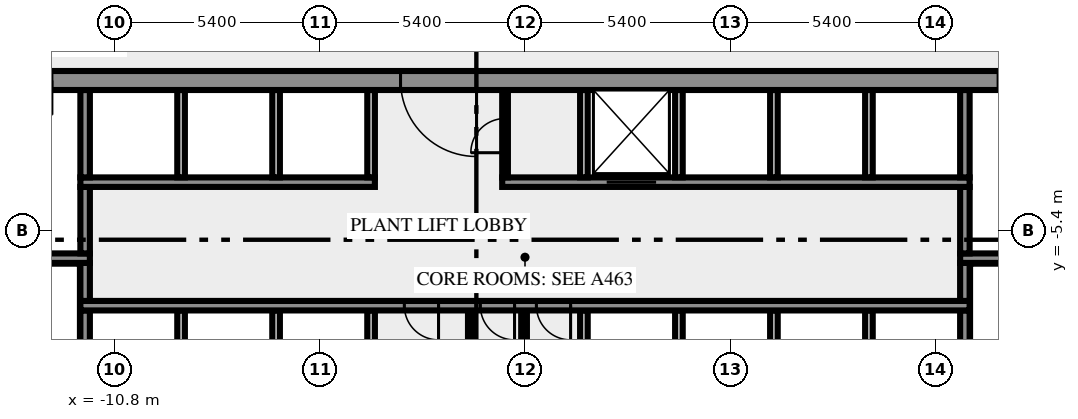
"""IFC4 building model, lengths in metres.
Left out: names, types, materials, properties, quantities, classifications, styles, units other than length and angle.
Written with IfcOpenShell. Run it as: python <this file> out.ifc"""

import sys

from ifc_helpers import new_model, si_unit, direction, frame, frame_2d, origin, place, context, subcontext, project, spatial, rectangle, extrude, element, fill, save


model = new_model("IFC4")
c1 = context("Model", 3, precision=1e-05, world=origin(), true_north=direction((0.0, 1.0)))
c2 = subcontext(c1, "Body", "Model", "MODEL_VIEW")
j1 = project(units=[si_unit("LENGTHUNIT", "METRE"), si_unit("PLANEANGLEUNIT", "RADIAN")], contexts=[c1])
p1 = place(None, origin())
s1 = spatial("IfcSite", under=j1, at=p1, CompositionType="ELEMENT")
p2 = place(p1, origin())
s2 = spatial("IfcBuilding", under=s1, at=p2, CompositionType="ELEMENT")
p3 = place(p2, frame((0.0, 0.0, 79.0)))
s3 = spatial("IfcBuildingStorey", under=s2, at=p3, CompositionType="ELEMENT", Elevation=79.0)
p4 = place(p3, frame((-11.575, -10.5, 0.0), z_axis=(0.0, 0.0, 1.0), x_axis=(0.0, 1.0, 0.0)))
e1 = element("IfcWall", 1, at=p4, inside=s3, PredefinedType="SHEAR", context=c2, shape_type="SweptSolid", body=[
    extrude(rectangle(XDim=3.0, YDim=0.25, at=frame_2d((1.5, 0.0))), origin(), (0.0, 0.0, 1.0), 5.65),
])
for number, where, z_axis, x_axis in (
    (2, (-9.05, -10.5, 0.0), (0.0, 0.0, 1.0), (0.0, 1.0, 0.0)),
    (3, (-6.55, -10.5, 0.0), (0.0, 0.0, 1.0), (0.0, 1.0, 0.0)),
    (4, (-4.05, -10.5, 0.0), (0.0, 0.0, 1.0), (0.0, 1.0, 0.0)),
):
    element("IfcWall", number, at=place(p3, frame(where, z_axis=z_axis, x_axis=x_axis)), inside=s3, PredefinedType="SOLIDWALL", context=c2, shape_type="SweptSolid", body=[
        extrude(rectangle(XDim=3.0, YDim=0.2, at=frame_2d((1.5, 0.0))), origin(), (0.0, 0.0, 1.0), 5.65),
    ])
for number, where, z_axis, x_axis in (
    (5, (-1.425, -10.5, 0.0), (0.0, 0.0, 1.0), (0.0, 1.0, 0.0)),
    (6, (-0.025, -10.5, 0.0), (0.0, 0.0, 1.0), (0.0, 1.0, 0.0)),
):
    element("IfcWall", number, at=place(p3, frame(where, z_axis=z_axis, x_axis=x_axis)), inside=s3, PredefinedType="PARTITIONING", context=c2, shape_type="SweptSolid", body=[
        extrude(rectangle(XDim=3.0, YDim=0.15, at=frame_2d((1.5, 0.0))), origin(), (0.0, 0.0, 1.0), 5.65),
    ])
for number, where, z_axis, x_axis in (
    (7, (1.55, -10.5, 0.0), (0.0, 0.0, 1.0), (0.0, 1.0, 0.0)),
    (8, (4.05, -10.5, 0.0), (0.0, 0.0, 1.0), (0.0, 1.0, 0.0)),
    (9, (6.55, -10.5, 0.0), (0.0, 0.0, 1.0), (0.0, 1.0, 0.0)),
    (10, (9.05, -10.5, 0.0), (0.0, 0.0, 1.0), (0.0, 1.0, 0.0)),
):
    element("IfcWall", number, at=place(p3, frame(where, z_axis=z_axis, x_axis=x_axis)), inside=s3, PredefinedType="SOLIDWALL", context=c2, shape_type="SweptSolid", body=[
        extrude(rectangle(XDim=3.0, YDim=0.2, at=frame_2d((1.5, 0.0))), origin(), (0.0, 0.0, 1.0), 5.65),
    ])
p5 = place(p3, frame((11.575, -10.5, 0.0), z_axis=(0.0, 0.0, 1.0), x_axis=(0.0, 1.0, 0.0)))
e11 = element("IfcWall", 11, at=p5, inside=s3, PredefinedType="SHEAR", context=c2, shape_type="SweptSolid", body=[
    extrude(rectangle(XDim=3.0, YDim=0.25, at=frame_2d((1.5, 0.0))), origin(), (0.0, 0.0, 1.0), 5.65),
])
p6 = place(p3, frame((11.7, -7.375, 0.0), z_axis=(0.0, 0.0, 1.0), x_axis=(-1.0, 0.0, 0.0)))
e12 = element("IfcWall", 12, at=p6, inside=s3, PredefinedType="SHEAR", context=c2, shape_type="SweptSolid", body=[
    extrude(rectangle(XDim=23.4, YDim=0.25, at=frame_2d((11.7, 0.0))), origin(), (0.0, 0.0, 1.0), 5.65),
])
p7 = place(p6, frame((13.975, 0.0, 0.0)))
e13 = element("IfcOpeningElement", 13, at=p7, cuts=e12, PredefinedType="OPENING", context=c2, shape_type="SweptSolid", body=[
    extrude(rectangle(XDim=0.9, YDim=2.1, at=frame_2d((0.45, 1.05))), frame((0.0, 0.135, 0.0), z_axis=(0.0, -1.0, 0.0), x_axis=(1.0, 0.0, 0.0)), (0.0, 0.0, 1.0), 0.27),
])
p8 = place(p6, frame((11.975, 0.0, 0.0)))
e14 = element("IfcOpeningElement", 14, at=p8, cuts=e12, PredefinedType="OPENING", context=c2, shape_type="SweptSolid", body=[
    extrude(rectangle(XDim=0.9, YDim=2.1, at=frame_2d((0.45, 1.05))), frame((0.0, 0.135, 0.0), z_axis=(0.0, -1.0, 0.0), x_axis=(1.0, 0.0, 0.0)), (0.0, 0.0, 1.0), 0.27),
])
p9 = place(p6, frame((10.5, 0.0, 0.0)))
e15 = element("IfcOpeningElement", 15, at=p9, cuts=e12, PredefinedType="OPENING", context=c2, shape_type="SweptSolid", body=[
    extrude(rectangle(XDim=0.9, YDim=2.1, at=frame_2d((0.45, 1.05))), frame((0.0, 0.135, 0.0), z_axis=(0.0, -1.0, 0.0), x_axis=(1.0, 0.0, 0.0)), (0.0, 0.0, 1.0), 0.27),
])
for number, where, z_axis, x_axis in (
    (16, (-11.575, -7.25, 0.0), (0.0, 0.0, 1.0), (0.0, 1.0, 0.0)),
    (17, (11.575, -7.25, 0.0), (0.0, 0.0, 1.0), (0.0, 1.0, 0.0)),
):
    element("IfcWall", number, at=place(p3, frame(where, z_axis=z_axis, x_axis=x_axis)), inside=s3, PredefinedType="SHEAR", context=c2, shape_type="SweptSolid", body=[
        extrude(rectangle(XDim=1.0, YDim=0.25, at=frame_2d((0.5, 0.0))), origin(), (0.0, 0.0, 1.0), 5.65),
    ])
p10 = place(p3, frame((-11.45, -6.125, 0.0), z_axis=(0.0, 0.0, 1.0), x_axis=(-1.0, 0.0, 0.0)))
e18 = element("IfcWall", 18, at=p10, inside=s3, PredefinedType="SHEAR", context=c2, shape_type="SweptSolid", body=[
    extrude(rectangle(XDim=8.05, YDim=0.25, at=frame_2d((4.025, 0.0))), origin(), (0.0, 0.0, 1.0), 5.65),
])
p11 = place(p10, frame((6.2, 0.0, 0.0)))
e19 = element("IfcOpeningElement", 19, at=p11, cuts=e18, PredefinedType="OPENING", context=c2, shape_type="SweptSolid", body=[
    extrude(rectangle(XDim=1.8, YDim=2.1, at=frame_2d((0.9, 1.05))), frame((0.0, 0.135, 0.0), z_axis=(0.0, -1.0, 0.0), x_axis=(1.0, 0.0, 0.0)), (0.0, 0.0, 1.0), 0.27),
])
p12 = place(p3, frame((19.5, -6.125, 0.0), z_axis=(0.0, 0.0, 1.0), x_axis=(-1.0, 0.0, 0.0)))
e20 = element("IfcWall", 20, at=p12, inside=s3, PredefinedType="SHEAR", context=c2, shape_type="SweptSolid", body=[
    extrude(rectangle(XDim=8.05, YDim=0.25, at=frame_2d((4.025, 0.0))), origin(), (0.0, 0.0, 1.0), 5.65),
])
p13 = place(p12, frame((0.05, 0.0, 0.0)))
e21 = element("IfcOpeningElement", 21, at=p13, cuts=e20, PredefinedType="OPENING", context=c2, shape_type="SweptSolid", body=[
    extrude(rectangle(XDim=1.8, YDim=2.1, at=frame_2d((0.9, 1.05))), frame((0.0, 0.135, 0.0), z_axis=(0.0, -1.0, 0.0), x_axis=(1.0, 0.0, 0.0)), (0.0, 0.0, 1.0), 0.27),
])
for number, where, z_axis, x_axis in (
    (22, (-11.575, -6.0, 0.0), (0.0, 0.0, 1.0), (0.0, 1.0, 0.0)),
    (23, (11.575, -6.0, 0.0), (0.0, 0.0, 1.0), (0.0, 1.0, 0.0)),
):
    element("IfcWall", number, at=place(p3, frame(where, z_axis=z_axis, x_axis=x_axis)), inside=s3, PredefinedType="SHEAR", context=c2, shape_type="SweptSolid", body=[
        extrude(rectangle(XDim=1.75, YDim=0.25, at=frame_2d((0.875, 0.0))), origin(), (0.0, 0.0, 1.0), 5.65),
    ])
p14 = place(p3, frame((-11.7, -4.125, 0.0), z_axis=(0.0, 0.0, 1.0), x_axis=(1.0, 0.0, 0.0)))
e24 = element("IfcWall", 24, at=p14, inside=s3, PredefinedType="SHEAR", context=c2, shape_type="SweptSolid", body=[
    extrude(rectangle(XDim=7.75, YDim=0.25, at=frame_2d((3.875, 0.0))), origin(), (0.0, 0.0, 1.0), 5.65),
])
p15 = place(p3, frame((-0.6, -4.125, 0.0), z_axis=(0.0, 0.0, 1.0), x_axis=(1.0, 0.0, 0.0)))
e25 = element("IfcWall", 25, at=p15, inside=s3, PredefinedType="SHEAR", context=c2, shape_type="SweptSolid", body=[
    extrude(rectangle(XDim=12.3, YDim=0.25, at=frame_2d((6.15, 0.0))), origin(), (0.0, 0.0, 1.0), 5.65),
])
p16 = place(p15, frame((2.75, 0.0, 0.0)))
e26 = element("IfcOpeningElement", 26, at=p16, cuts=e25, PredefinedType="OPENING", context=c2, shape_type="SweptSolid", body=[
    extrude(rectangle(XDim=1.3, YDim=2.1, at=frame_2d((0.65, 1.05))), frame((0.0, 0.135, 0.0), z_axis=(0.0, -1.0, 0.0), x_axis=(1.0, 0.0, 0.0)), (0.0, 0.0, 1.0), 0.27),
])
p17 = place(p3, frame((-11.575, -4.0, 0.0), z_axis=(0.0, 0.0, 1.0), x_axis=(0.0, 1.0, 0.0)))
e27 = element("IfcWall", 27, at=p17, inside=s3, PredefinedType="SHEAR", context=c2, shape_type="SweptSolid", body=[
    extrude(rectangle(XDim=2.3, YDim=0.25, at=frame_2d((1.15, 0.0))), origin(), (0.0, 0.0, 1.0), 5.65),
])
for number, where, z_axis, x_axis in (
    (28, (-9.05, -4.0, 0.0), (0.0, 0.0, 1.0), (0.0, 1.0, 0.0)),
    (29, (-6.55, -4.0, 0.0), (0.0, 0.0, 1.0), (0.0, 1.0, 0.0)),
    (30, (-4.05, -4.0, 0.0), (0.0, 0.0, 1.0), (0.0, 1.0, 0.0)),
):
    element("IfcWall", number, at=place(p3, frame(where, z_axis=z_axis, x_axis=x_axis)), inside=s3, PredefinedType="SOLIDWALL", context=c2, shape_type="SweptSolid", body=[
        extrude(rectangle(XDim=2.3, YDim=0.2, at=frame_2d((1.15, 0.0))), origin(), (0.0, 0.0, 1.0), 5.65),
    ])
p18 = place(p3, frame((-0.525, -4.0, 0.0), z_axis=(0.0, 0.0, 1.0), x_axis=(0.0, 1.0, 0.0)))
e31 = element("IfcWall", 31, at=p18, inside=s3, PredefinedType="PARTITIONING", context=c2, shape_type="SweptSolid", body=[
    extrude(rectangle(XDim=2.3, YDim=0.15, at=frame_2d((1.15, 0.0))), origin(), (0.0, 0.0, 1.0), 5.65),
])
p19 = place(p18, frame((0.65, 0.0, 0.0)))
e32 = element("IfcOpeningElement", 32, at=p19, cuts=e31, PredefinedType="OPENING", context=c2, shape_type="SweptSolid", body=[
    extrude(rectangle(XDim=0.9, YDim=2.1, at=frame_2d((0.45, 1.05))), frame((0.0, 0.085, 0.0), z_axis=(0.0, -1.0, 0.0), x_axis=(1.0, 0.0, 0.0)), (0.0, 0.0, 1.0), 0.17),
])
for number, where, z_axis, x_axis in (
    (33, (1.55, -4.0, 0.0), (0.0, 0.0, 1.0), (0.0, 1.0, 0.0)),
    (34, (4.05, -4.0, 0.0), (0.0, 0.0, 1.0), (0.0, 1.0, 0.0)),
    (35, (6.55, -4.0, 0.0), (0.0, 0.0, 1.0), (0.0, 1.0, 0.0)),
    (36, (9.05, -4.0, 0.0), (0.0, 0.0, 1.0), (0.0, 1.0, 0.0)),
):
    element("IfcWall", number, at=place(p3, frame(where, z_axis=z_axis, x_axis=x_axis)), inside=s3, PredefinedType="SOLIDWALL", context=c2, shape_type="SweptSolid", body=[
        extrude(rectangle(XDim=2.3, YDim=0.2, at=frame_2d((1.15, 0.0))), origin(), (0.0, 0.0, 1.0), 5.65),
    ])
p20 = place(p3, frame((11.575, -4.0, 0.0), z_axis=(0.0, 0.0, 1.0), x_axis=(0.0, 1.0, 0.0)))
e37 = element("IfcWall", 37, at=p20, inside=s3, PredefinedType="SHEAR", context=c2, shape_type="SweptSolid", body=[
    extrude(rectangle(XDim=2.3, YDim=0.25, at=frame_2d((1.15, 0.0))), origin(), (0.0, 0.0, 1.0), 5.65),
])
p21 = place(p3, frame((20.49, -1.45, 0.0), z_axis=(0.0, 0.0, 1.0), x_axis=(-1.0, 0.0, 0.0)))
e38 = element("IfcWall", 38, at=p21, inside=s3, PredefinedType="SHEAR", context=c2, shape_type="SweptSolid", body=[
    extrude(rectangle(XDim=40.98, YDim=0.5, at=frame_2d((20.49, 0.0))), origin(), (0.0, 0.0, 1.0), 5.65),
])
p22 = place(p21, frame((38.14, 0.0, 0.0)))
e39 = element("IfcOpeningElement", 39, at=p22, cuts=e38, PredefinedType="OPENING", context=c2, shape_type="SweptSolid", body=[
    extrude(rectangle(XDim=1.8, YDim=2.1, at=frame_2d((0.9, 1.05))), frame((0.0, 0.26, 0.0), z_axis=(0.0, -1.0, 0.0), x_axis=(1.0, 0.0, 0.0)), (0.0, 0.0, 1.0), 0.52),
])
p23 = place(p21, frame((36.728, 0.0, 0.0)))
e40 = element("IfcOpeningElement", 40, at=p23, cuts=e38, PredefinedType="OPENING", context=c2, shape_type="SweptSolid", body=[
    extrude(rectangle(XDim=0.8, YDim=2.1, at=frame_2d((0.4, 1.05))), frame((0.0, 0.26, 0.0), z_axis=(0.0, -1.0, 0.0), x_axis=(1.0, 0.0, 0.0)), (0.0, 0.0, 1.0), 0.52),
])
p24 = place(p21, frame((35.153, 0.0, 0.0)))
e41 = element("IfcOpeningElement", 41, at=p24, cuts=e38, PredefinedType="OPENING", context=c2, shape_type="SweptSolid", body=[
    extrude(rectangle(XDim=0.8, YDim=2.1, at=frame_2d((0.4, 1.05))), frame((0.0, 0.26, 0.0), z_axis=(0.0, -1.0, 0.0), x_axis=(1.0, 0.0, 0.0)), (0.0, 0.0, 1.0), 0.52),
])
p25 = place(p21, frame((32.94, 0.0, 0.0)))
e42 = element("IfcOpeningElement", 42, at=p25, cuts=e38, PredefinedType="OPENING", context=c2, shape_type="SweptSolid", body=[
    extrude(rectangle(XDim=0.9, YDim=2.1, at=frame_2d((0.45, 1.05))), frame((0.0, 0.26, 0.0), z_axis=(0.0, -1.0, 0.0), x_axis=(1.0, 0.0, 0.0)), (0.0, 0.0, 1.0), 0.52),
])
p26 = place(p21, frame((21.765, 0.0, 0.0)))
e43 = element("IfcOpeningElement", 43, at=p26, cuts=e38, PredefinedType="OPENING", context=c2, shape_type="SweptSolid", body=[
    extrude(rectangle(XDim=2.0, YDim=2.1, at=frame_2d((1.0, 1.05))), frame((0.0, 0.26, 0.0), z_axis=(0.0, -1.0, 0.0), x_axis=(1.0, 0.0, 0.0)), (0.0, 0.0, 1.0), 0.52),
])
p27 = place(p21, frame((7.14, 0.0, 0.0)))
e44 = element("IfcOpeningElement", 44, at=p27, cuts=e38, PredefinedType="OPENING", context=c2, shape_type="SweptSolid", body=[
    extrude(rectangle(XDim=0.9, YDim=2.1, at=frame_2d((0.45, 1.05))), frame((0.0, 0.26, 0.0), z_axis=(0.0, -1.0, 0.0), x_axis=(1.0, 0.0, 0.0)), (0.0, 0.0, 1.0), 0.52),
])
p28 = place(p21, frame((4.19, 0.0, 0.0)))
e45 = element("IfcOpeningElement", 45, at=p28, cuts=e38, PredefinedType="OPENING", context=c2, shape_type="SweptSolid", body=[
    extrude(rectangle(XDim=0.9, YDim=2.1, at=frame_2d((0.45, 1.05))), frame((0.0, 0.26, 0.0), z_axis=(0.0, -1.0, 0.0), x_axis=(1.0, 0.0, 0.0)), (0.0, 0.0, 1.0), 0.52),
])
p29 = place(p21, frame((1.04, 0.0, 0.0)))
e46 = element("IfcOpeningElement", 46, at=p29, cuts=e38, PredefinedType="OPENING", context=c2, shape_type="SweptSolid", body=[
    extrude(rectangle(XDim=1.8, YDim=2.1, at=frame_2d((0.9, 1.05))), frame((0.0, 0.26, 0.0), z_axis=(0.0, -1.0, 0.0), x_axis=(1.0, 0.0, 0.0)), (0.0, 0.0, 1.0), 0.52),
])
p30 = place(p7, origin())
e47 = element("IfcDoor", 47, at=p30, inside=s3, OperationType="SINGLE_SWING_RIGHT", PredefinedType="DOOR", context=c2, shape_type="SweptSolid", body=[
    extrude(rectangle(XDim=0.9, YDim=2.1, at=frame_2d((0.45, 1.05))), frame((0.0, 0.025, 0.0), z_axis=(0.0, -1.0, 0.0), x_axis=(1.0, 0.0, 0.0)), (0.0, 0.0, 1.0), 0.05),
])
fill(e13, e47)
p31 = place(p8, origin())
e48 = element("IfcDoor", 48, at=p31, inside=s3, OperationType="SINGLE_SWING_RIGHT", PredefinedType="DOOR", context=c2, shape_type="SweptSolid", body=[
    extrude(rectangle(XDim=0.9, YDim=2.1, at=frame_2d((0.45, 1.05))), frame((0.0, 0.025, 0.0), z_axis=(0.0, -1.0, 0.0), x_axis=(1.0, 0.0, 0.0)), (0.0, 0.0, 1.0), 0.05),
])
fill(e14, e48)
p32 = place(p9, origin())
e49 = element("IfcDoor", 49, at=p32, inside=s3, OperationType="SINGLE_SWING_LEFT", PredefinedType="DOOR", context=c2, shape_type="SweptSolid", body=[
    extrude(rectangle(XDim=0.9, YDim=2.1, at=frame_2d((0.45, 1.05))), frame((0.0, 0.025, 0.0), z_axis=(0.0, -1.0, 0.0), x_axis=(1.0, 0.0, 0.0)), (0.0, 0.0, 1.0), 0.05),
])
fill(e15, e49)
p33 = place(p16, origin())
e50 = element("IfcDoor", 50, at=p33, inside=s3, OperationType="DOUBLE_DOOR_SLIDING", PredefinedType="DOOR", context=c2, shape_type="SweptSolid", body=[
    extrude(rectangle(XDim=1.3, YDim=2.1, at=frame_2d((0.65, 1.05))), frame((0.0, 0.025, 0.0), z_axis=(0.0, -1.0, 0.0), x_axis=(1.0, 0.0, 0.0)), (0.0, 0.0, 1.0), 0.05),
])
fill(e26, e50)
p34 = place(p19, origin())
e51 = element("IfcDoor", 51, at=p34, inside=s3, OperationType="SINGLE_SWING_LEFT", PredefinedType="DOOR", context=c2, shape_type="SweptSolid", body=[
    extrude(rectangle(XDim=0.9, YDim=2.1, at=frame_2d((0.45, 1.05))), frame((0.0, 0.025, 0.0), z_axis=(0.0, -1.0, 0.0), x_axis=(1.0, 0.0, 0.0)), (0.0, 0.0, 1.0), 0.05),
])
fill(e32, e51)
p35 = place(p26, origin())
e52 = element("IfcDoor", 52, at=p35, inside=s3, OperationType="DOUBLE_DOOR_SINGLE_SWING", PredefinedType="DOOR", context=c2, shape_type="SweptSolid", body=[
    extrude(rectangle(XDim=2.0, YDim=2.1, at=frame_2d((1.0, 1.05))), frame((0.0, 0.025, 0.0), z_axis=(0.0, -1.0, 0.0), x_axis=(1.0, 0.0, 0.0)), (0.0, 0.0, 1.0), 0.05),
])
fill(e43, e52)
save(model, sys.argv[1])
